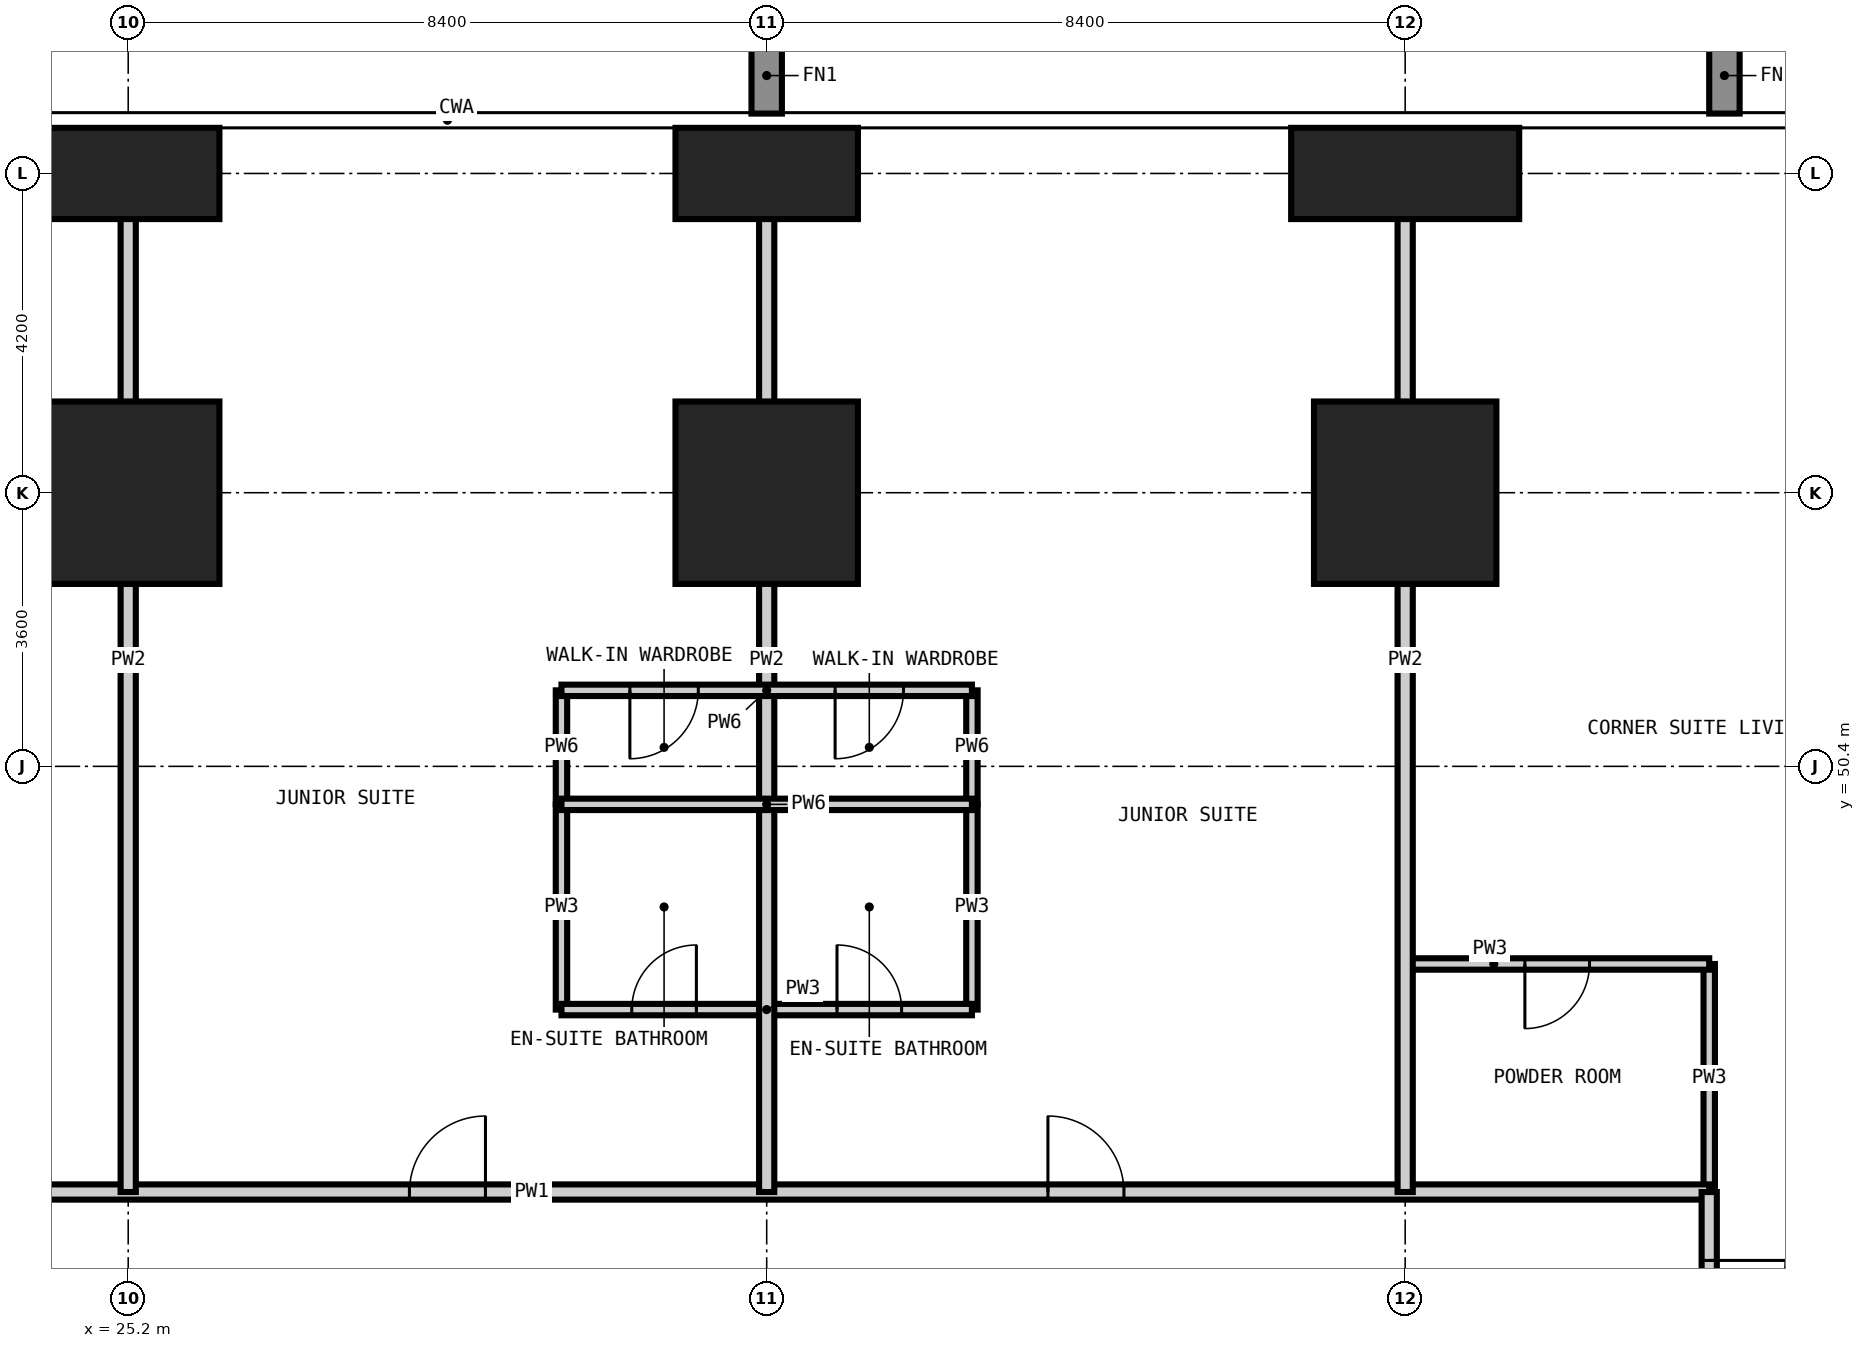
"""IFC4 building model, lengths in metres.
Left out: names, types, materials, properties, quantities, classifications, styles, units other than length and angle.
Written with IfcOpenShell. Run it as: python <this file> out.ifc"""

import sys

from ifc_helpers import new_model, si_unit, direction, frame, frame_2d, origin, origin_2d, place, context, subcontext, project, spatial, rectangle, extrude, element, fill, save


model = new_model("IFC4")
c1 = context("Model", 3, precision=1e-05, world=origin(), true_north=direction((0.0, 1.0)))
c2 = subcontext(c1, "Body", "Model", "MODEL_VIEW")
j1 = project(units=[si_unit("LENGTHUNIT", "METRE"), si_unit("PLANEANGLEUNIT", "RADIAN")], contexts=[c1])
p1 = place(None, origin())
s1 = spatial("IfcSite", under=j1, at=p1, CompositionType="ELEMENT")
p2 = place(p1, origin())
s2 = spatial("IfcBuilding", under=s1, at=p2, CompositionType="ELEMENT")
p3 = place(p2, frame((0.0, 0.0, 84.6)))
s3 = spatial("IfcBuildingStorey", under=s2, at=p3, CompositionType="ELEMENT", Elevation=84.6)
p4 = place(p3, frame((25.2, 54.0, -0.35), z_axis=(0.0, 0.0, 1.0), x_axis=(1.0, 0.0, 0.0)))
e1 = element("IfcColumn", 1, at=p4, inside=s3, PredefinedType="COLUMN", context=c2, shape_type="SweptSolid", body=[
    extrude(rectangle(XDim=2.4, YDim=2.4, at=origin_2d()), origin(), (0.0, 0.0, 1.0), 3.55),
])
p5 = place(p3, frame((25.2, 58.2, -0.35), z_axis=(0.0, 0.0, 1.0), x_axis=(1.0, 0.0, 0.0)))
e2 = element("IfcColumn", 2, at=p5, inside=s3, PredefinedType="COLUMN", context=c2, shape_type="SweptSolid", body=[
    extrude(rectangle(XDim=2.4, YDim=1.2, at=origin_2d()), origin(), (0.0, 0.0, 1.0), 3.55),
])
p6 = place(p3, frame((33.6, 54.0, -0.35), z_axis=(0.0, 0.0, 1.0), x_axis=(1.0, 0.0, 0.0)))
e3 = element("IfcColumn", 3, at=p6, inside=s3, PredefinedType="COLUMN", context=c2, shape_type="SweptSolid", body=[
    extrude(rectangle(XDim=2.4, YDim=2.4, at=origin_2d()), origin(), (0.0, 0.0, 1.0), 3.55),
])
p7 = place(p3, frame((33.6, 58.2, -0.35), z_axis=(0.0, 0.0, 1.0), x_axis=(1.0, 0.0, 0.0)))
e4 = element("IfcColumn", 4, at=p7, inside=s3, PredefinedType="COLUMN", context=c2, shape_type="SweptSolid", body=[
    extrude(rectangle(XDim=2.4, YDim=1.2, at=origin_2d()), origin(), (0.0, 0.0, 1.0), 3.55),
])
p8 = place(p3, frame((42.0, 54.0, -0.35), z_axis=(0.0, 0.0, 1.0), x_axis=(1.0, 0.0, 0.0)))
e5 = element("IfcColumn", 5, at=p8, inside=s3, PredefinedType="COLUMN", context=c2, shape_type="SweptSolid", body=[
    extrude(rectangle(XDim=2.4, YDim=2.4, at=origin_2d()), origin(), (0.0, 0.0, 1.0), 3.55),
])
p9 = place(p3, frame((42.0, 58.2, -0.35), z_axis=(0.0, 0.0, 1.0), x_axis=(1.0, 0.0, 0.0)))
e6 = element("IfcColumn", 6, at=p9, inside=s3, PredefinedType="COLUMN", context=c2, shape_type="SweptSolid", body=[
    extrude(rectangle(XDim=3.0, YDim=1.2, at=origin_2d()), origin(), (0.0, 0.0, 1.0), 3.55),
])
for number, where, z_axis, x_axis in (
    (7, (30.9, 47.2, 0.0), (0.0, 0.0, 1.0), (0.0, 1.0, 0.0)),
    (8, (36.3, 47.2, 0.0), (0.0, 0.0, 1.0), (0.0, 1.0, 0.0)),
):
    element("IfcWall", number, at=place(p3, frame(where, z_axis=z_axis, x_axis=x_axis)), inside=s3, PredefinedType="PARTITIONING", context=c2, shape_type="SweptSolid", body=[
        extrude(rectangle(XDim=2.7, YDim=0.15, at=frame_2d((1.35, 0.0))), origin(), (0.0, 0.0, 1.0), 3.2),
    ])
p10 = place(p3, frame((46.0, 44.8, 0.0), z_axis=(0.0, 0.0, 1.0), x_axis=(0.0, 1.0, 0.0)))
e9 = element("IfcWall", 9, at=p10, inside=s3, PredefinedType="PARTITIONING", context=c2, shape_type="SweptSolid", body=[
    extrude(rectangle(XDim=3.0, YDim=0.15, at=frame_2d((1.5, 0.0))), origin(), (0.0, 0.0, 1.0), 3.2),
])
p11 = place(p3, frame((30.9, 47.2, 0.0), z_axis=(0.0, 0.0, 1.0), x_axis=(1.0, 0.0, 0.0)))
e10 = element("IfcWall", 10, at=p11, inside=s3, PredefinedType="PARTITIONING", context=c2, shape_type="SweptSolid", body=[
    extrude(rectangle(XDim=5.4, YDim=0.15, at=frame_2d((2.7, 0.0))), origin(), (0.0, 0.0, 1.0), 3.2),
])
p12 = place(p11, frame((0.925, 0.0, 0.0)))
e11 = element("IfcOpeningElement", 11, at=p12, cuts=e10, PredefinedType="OPENING", context=c2, shape_type="SweptSolid", body=[
    extrude(rectangle(XDim=0.85, YDim=2.1, at=frame_2d((0.425, 1.05))), frame((0.0, 0.085, 0.0), z_axis=(0.0, -1.0, 0.0), x_axis=(1.0, 0.0, 0.0)), (0.0, 0.0, 1.0), 0.17),
])
p13 = place(p11, frame((3.625, 0.0, 0.0)))
e12 = element("IfcOpeningElement", 12, at=p13, cuts=e10, PredefinedType="OPENING", context=c2, shape_type="SweptSolid", body=[
    extrude(rectangle(XDim=0.85, YDim=2.1, at=frame_2d((0.425, 1.05))), frame((0.0, 0.085, 0.0), z_axis=(0.0, -1.0, 0.0), x_axis=(1.0, 0.0, 0.0)), (0.0, 0.0, 1.0), 0.17),
])
p14 = place(p3, frame((42.0, 47.8, 0.0), z_axis=(0.0, 0.0, 1.0), x_axis=(1.0, 0.0, 0.0)))
e13 = element("IfcWall", 13, at=p14, inside=s3, PredefinedType="PARTITIONING", context=c2, shape_type="SweptSolid", body=[
    extrude(rectangle(XDim=4.0, YDim=0.15, at=frame_2d((2.0, 0.0))), origin(), (0.0, 0.0, 1.0), 3.2),
])
p15 = place(p14, frame((1.575, 0.0, 0.0)))
e14 = element("IfcOpeningElement", 14, at=p15, cuts=e13, PredefinedType="OPENING", context=c2, shape_type="SweptSolid", body=[
    extrude(rectangle(XDim=0.85, YDim=2.1, at=frame_2d((0.425, 1.05))), frame((0.0, 0.085, 0.0), z_axis=(0.0, -1.0, 0.0), x_axis=(1.0, 0.0, 0.0)), (0.0, 0.0, 1.0), 0.17),
])
p16 = place(p3, frame((13.4, 44.8, 0.0), z_axis=(0.0, 0.0, 1.0), x_axis=(1.0, 0.0, 0.0)))
e15 = element("IfcWall", 15, at=p16, inside=s3, PredefinedType="PARTITIONING", context=c2, shape_type="SweptSolid", body=[
    extrude(rectangle(XDim=32.6, YDim=0.2, at=frame_2d((16.3, 0.0))), origin(), (0.0, 0.0, 1.0), 3.2),
])
p17 = place(p16, frame((7.1, 0.0, 0.0)))
e16 = element("IfcOpeningElement", 16, at=p17, cuts=e15, PredefinedType="OPENING", context=c2, shape_type="SweptSolid", body=[
    extrude(rectangle(XDim=1.0, YDim=2.2, at=frame_2d((0.5, 1.1))), frame((0.0, 0.11, 0.0), z_axis=(0.0, -1.0, 0.0), x_axis=(1.0, 0.0, 0.0)), (0.0, 0.0, 1.0), 0.22),
])
p18 = place(p16, frame((15.5, 0.0, 0.0)))
e17 = element("IfcOpeningElement", 17, at=p18, cuts=e15, PredefinedType="OPENING", context=c2, shape_type="SweptSolid", body=[
    extrude(rectangle(XDim=1.0, YDim=2.2, at=frame_2d((0.5, 1.1))), frame((0.0, 0.11, 0.0), z_axis=(0.0, -1.0, 0.0), x_axis=(1.0, 0.0, 0.0)), (0.0, 0.0, 1.0), 0.22),
])
p19 = place(p16, frame((23.9, 0.0, 0.0)))
e18 = element("IfcOpeningElement", 18, at=p19, cuts=e15, PredefinedType="OPENING", context=c2, shape_type="SweptSolid", body=[
    extrude(rectangle(XDim=1.0, YDim=2.2, at=frame_2d((0.5, 1.1))), frame((0.0, 0.11, 0.0), z_axis=(0.0, -1.0, 0.0), x_axis=(1.0, 0.0, 0.0)), (0.0, 0.0, 1.0), 0.22),
])
p20 = place(p3, frame((46.0, 44.8, 0.0), z_axis=(0.0, 0.0, 1.0), x_axis=(0.0, -1.0, 0.0)))
e19 = element("IfcWall", 19, at=p20, inside=s3, PredefinedType="PARTITIONING", context=c2, shape_type="SweptSolid", body=[
    extrude(rectangle(XDim=31.4, YDim=0.2, at=frame_2d((15.7, 0.0))), origin(), (0.0, 0.0, 1.0), 3.2),
])
p21 = place(p20, frame((21.2, 0.0, 0.0)))
e20 = element("IfcOpeningElement", 20, at=p21, cuts=e19, PredefinedType="OPENING", context=c2, shape_type="SweptSolid", body=[
    extrude(rectangle(XDim=1.0, YDim=2.2, at=frame_2d((0.5, 1.1))), frame((0.0, 0.11, 0.0), z_axis=(0.0, -1.0, 0.0), x_axis=(1.0, 0.0, 0.0)), (0.0, 0.0, 1.0), 0.22),
])
p22 = place(p20, frame((8.6, 0.0, 0.0)))
e21 = element("IfcOpeningElement", 21, at=p22, cuts=e19, PredefinedType="OPENING", context=c2, shape_type="SweptSolid", body=[
    extrude(rectangle(XDim=1.0, YDim=2.2, at=frame_2d((0.5, 1.1))), frame((0.0, 0.11, 0.0), z_axis=(0.0, -1.0, 0.0), x_axis=(1.0, 0.0, 0.0)), (0.0, 0.0, 1.0), 0.22),
])
p23 = place(p20, frame((29.2, 0.0, 0.0)))
e22 = element("IfcOpeningElement", 22, at=p23, cuts=e19, PredefinedType="OPENING", context=c2, shape_type="SweptSolid", body=[
    extrude(rectangle(XDim=1.0, YDim=2.2, at=frame_2d((0.5, 1.1))), frame((0.0, 0.11, 0.0), z_axis=(0.0, -1.0, 0.0), x_axis=(1.0, 0.0, 0.0)), (0.0, 0.0, 1.0), 0.22),
])
p24 = place(p20, frame((0.9, 0.0, 0.0)))
e23 = element("IfcOpeningElement", 23, at=p24, cuts=e19, PredefinedType="OPENING", context=c2, shape_type="SweptSolid", body=[
    extrude(rectangle(XDim=1.0, YDim=2.2, at=frame_2d((0.5, 1.1))), frame((0.0, 0.11, 0.0), z_axis=(0.0, -1.0, 0.0), x_axis=(1.0, 0.0, 0.0)), (0.0, 0.0, 1.0), 0.22),
])
for number, where, z_axis, x_axis in (
    (24, (25.2, 44.8, 0.0), (0.0, 0.0, 1.0), (0.0, 1.0, 0.0)),
    (25, (33.6, 44.8, 0.0), (0.0, 0.0, 1.0), (0.0, 1.0, 0.0)),
    (26, (42.0, 44.8, 0.0), (0.0, 0.0, 1.0), (0.0, 1.0, 0.0)),
):
    element("IfcWall", number, at=place(p3, frame(where, z_axis=z_axis, x_axis=x_axis)), inside=s3, PredefinedType="PARTITIONING", context=c2, shape_type="SweptSolid", body=[
        extrude(rectangle(XDim=14.008, YDim=0.2, at=frame_2d((7.004, 0.0))), origin(), (0.0, 0.0, 1.0), 3.2),
    ])
for number, where, z_axis, x_axis in (
    (27, (30.9, 49.9, 0.0), (0.0, 0.0, 1.0), (0.0, 1.0, 0.0)),
    (28, (36.3, 49.9, 0.0), (0.0, 0.0, 1.0), (0.0, 1.0, 0.0)),
):
    element("IfcWall", number, at=place(p3, frame(where, z_axis=z_axis, x_axis=x_axis)), inside=s3, PredefinedType="PARTITIONING", context=c2, shape_type="SweptSolid", body=[
        extrude(rectangle(XDim=1.5, YDim=0.15, at=frame_2d((0.75, 0.0))), origin(), (0.0, 0.0, 1.0), 3.2),
    ])
p25 = place(p3, frame((30.9, 49.9, 0.0), z_axis=(0.0, 0.0, 1.0), x_axis=(1.0, 0.0, 0.0)))
e29 = element("IfcWall", 29, at=p25, inside=s3, PredefinedType="PARTITIONING", context=c2, shape_type="SweptSolid", body=[
    extrude(rectangle(XDim=5.4, YDim=0.15, at=frame_2d((2.7, 0.0))), origin(), (0.0, 0.0, 1.0), 3.2),
])
p26 = place(p3, frame((30.9, 51.4, 0.0), z_axis=(0.0, 0.0, 1.0), x_axis=(1.0, 0.0, 0.0)))
e30 = element("IfcWall", 30, at=p26, inside=s3, PredefinedType="PARTITIONING", context=c2, shape_type="SweptSolid", body=[
    extrude(rectangle(XDim=5.4, YDim=0.15, at=frame_2d((2.7, 0.0))), origin(), (0.0, 0.0, 1.0), 3.2),
])
p27 = place(p26, frame((0.9, 0.0, 0.0)))
e31 = element("IfcOpeningElement", 31, at=p27, cuts=e30, PredefinedType="OPENING", context=c2, shape_type="SweptSolid", body=[
    extrude(rectangle(XDim=0.9, YDim=2.1, at=frame_2d((0.45, 1.05))), frame((0.0, 0.085, 0.0), z_axis=(0.0, -1.0, 0.0), x_axis=(1.0, 0.0, 0.0)), (0.0, 0.0, 1.0), 0.17),
])
p28 = place(p26, frame((3.6, 0.0, 0.0)))
e32 = element("IfcOpeningElement", 32, at=p28, cuts=e30, PredefinedType="OPENING", context=c2, shape_type="SweptSolid", body=[
    extrude(rectangle(XDim=0.9, YDim=2.1, at=frame_2d((0.45, 1.05))), frame((0.0, 0.085, 0.0), z_axis=(0.0, -1.0, 0.0), x_axis=(1.0, 0.0, 0.0)), (0.0, 0.0, 1.0), 0.17),
])
p29 = place(p18, origin())
e33 = element("IfcDoor", 33, at=p29, inside=s3, OperationType="SINGLE_SWING_RIGHT", PredefinedType="DOOR", context=c2, shape_type="SweptSolid", body=[
    extrude(rectangle(XDim=1.0, YDim=2.2, at=frame_2d((0.5, 1.1))), frame((0.0, 0.025, 0.0), z_axis=(0.0, -1.0, 0.0), x_axis=(1.0, 0.0, 0.0)), (0.0, 0.0, 1.0), 0.05),
])
fill(e17, e33)
p30 = place(p12, origin())
e34 = element("IfcDoor", 34, at=p30, inside=s3, OperationType="SINGLE_SWING_RIGHT", PredefinedType="DOOR", context=c2, shape_type="SweptSolid", body=[
    extrude(rectangle(XDim=0.85, YDim=2.1, at=frame_2d((0.425, 1.05))), frame((0.0, 0.025, 0.0), z_axis=(0.0, -1.0, 0.0), x_axis=(1.0, 0.0, 0.0)), (0.0, 0.0, 1.0), 0.05),
])
fill(e11, e34)
p31 = place(p27, frame((0.9, 0.0, 0.0), z_axis=(0.0, 0.0, 1.0), x_axis=(-1.0, 0.0, 0.0)))
e35 = element("IfcDoor", 35, at=p31, inside=s3, OperationType="SINGLE_SWING_RIGHT", PredefinedType="DOOR", context=c2, shape_type="SweptSolid", body=[
    extrude(rectangle(XDim=0.9, YDim=2.1, at=frame_2d((0.45, 1.05))), frame((0.0, 0.025, 0.0), z_axis=(0.0, -1.0, 0.0), x_axis=(1.0, 0.0, 0.0)), (0.0, 0.0, 1.0), 0.05),
])
fill(e31, e35)
p32 = place(p19, origin())
e36 = element("IfcDoor", 36, at=p32, inside=s3, OperationType="SINGLE_SWING_LEFT", PredefinedType="DOOR", context=c2, shape_type="SweptSolid", body=[
    extrude(rectangle(XDim=1.0, YDim=2.2, at=frame_2d((0.5, 1.1))), frame((0.0, 0.025, 0.0), z_axis=(0.0, -1.0, 0.0), x_axis=(1.0, 0.0, 0.0)), (0.0, 0.0, 1.0), 0.05),
])
fill(e18, e36)
p33 = place(p13, origin())
e37 = element("IfcDoor", 37, at=p33, inside=s3, OperationType="SINGLE_SWING_LEFT", PredefinedType="DOOR", context=c2, shape_type="SweptSolid", body=[
    extrude(rectangle(XDim=0.85, YDim=2.1, at=frame_2d((0.425, 1.05))), frame((0.0, 0.025, 0.0), z_axis=(0.0, -1.0, 0.0), x_axis=(1.0, 0.0, 0.0)), (0.0, 0.0, 1.0), 0.05),
])
fill(e12, e37)
p34 = place(p28, frame((0.9, 0.0, 0.0), z_axis=(0.0, 0.0, 1.0), x_axis=(-1.0, 0.0, 0.0)))
e38 = element("IfcDoor", 38, at=p34, inside=s3, OperationType="SINGLE_SWING_RIGHT", PredefinedType="DOOR", context=c2, shape_type="SweptSolid", body=[
    extrude(rectangle(XDim=0.9, YDim=2.1, at=frame_2d((0.45, 1.05))), frame((0.0, 0.025, 0.0), z_axis=(0.0, -1.0, 0.0), x_axis=(1.0, 0.0, 0.0)), (0.0, 0.0, 1.0), 0.05),
])
fill(e32, e38)
p35 = place(p24, origin())
e39 = element("IfcDoor", 39, at=p35, inside=s3, OperationType="SINGLE_SWING_LEFT", PredefinedType="DOOR", context=c2, shape_type="SweptSolid", body=[
    extrude(rectangle(XDim=1.0, YDim=2.2, at=frame_2d((0.5, 1.1))), frame((0.0, 0.025, 0.0), z_axis=(0.0, -1.0, 0.0), x_axis=(1.0, 0.0, 0.0)), (0.0, 0.0, 1.0), 0.05),
])
fill(e23, e39)
p36 = place(p15, frame((0.85, 0.0, 0.0), z_axis=(0.0, 0.0, 1.0), x_axis=(-1.0, 0.0, 0.0)))
e40 = element("IfcDoor", 40, at=p36, inside=s3, OperationType="SINGLE_SWING_RIGHT", PredefinedType="DOOR", context=c2, shape_type="SweptSolid", body=[
    extrude(rectangle(XDim=0.85, YDim=2.1, at=frame_2d((0.425, 1.05))), frame((0.0, 0.025, 0.0), z_axis=(0.0, -1.0, 0.0), x_axis=(1.0, 0.0, 0.0)), (0.0, 0.0, 1.0), 0.05),
])
fill(e14, e40)
save(model, sys.argv[1])
